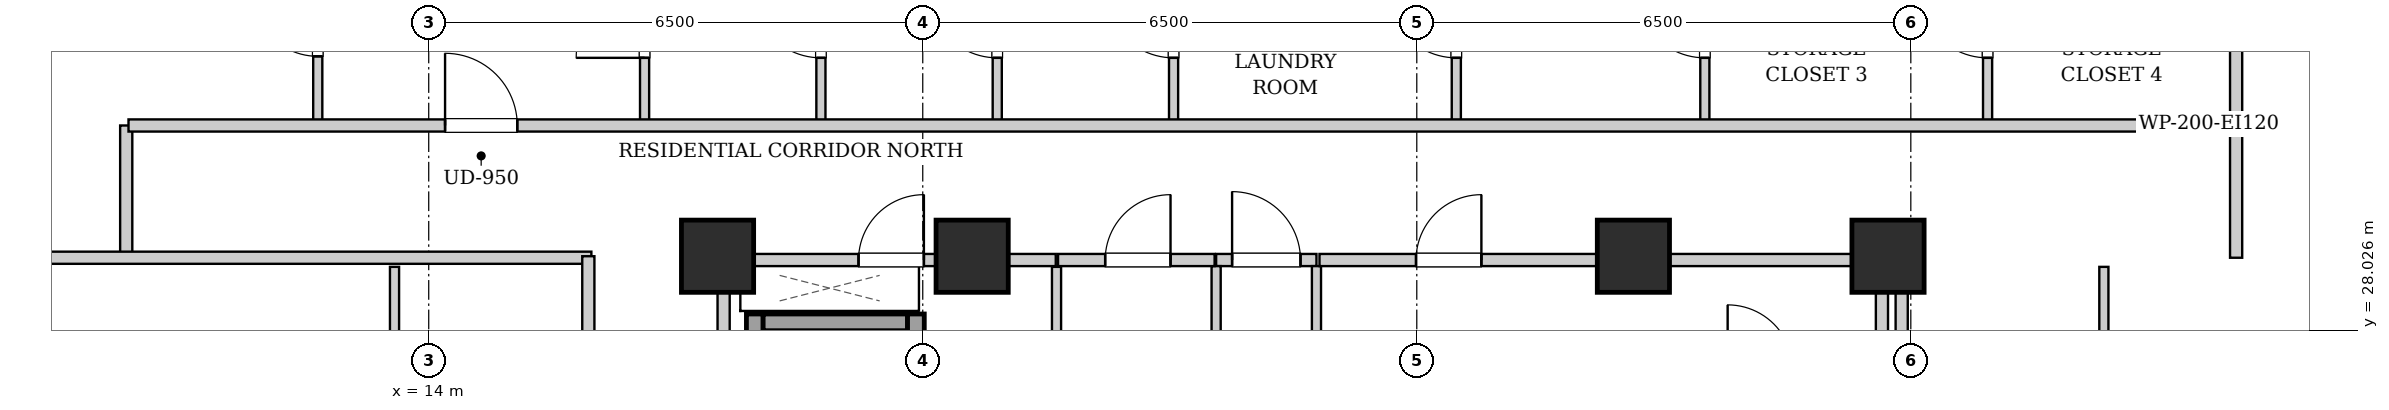
"""IFC4 building model, lengths in metres.
Left out: names, types, materials, properties, quantities, classifications, styles, units other than length and angle.
Written with IfcOpenShell. Run it as: python <this file> out.ifc"""

import sys

from ifc_helpers import new_model, si_unit, direction, frame, frame_2d, origin, origin_2d, place, context, subcontext, project, spatial, rectangle, extrude, element, fill, save


model = new_model("IFC4")
c1 = context("Model", 3, precision=1e-05, world=origin(), true_north=direction((0.0, 1.0)))
c2 = subcontext(c1, "Body", "Model", "MODEL_VIEW")
j1 = project(units=[si_unit("LENGTHUNIT", "METRE"), si_unit("PLANEANGLEUNIT", "RADIAN")], contexts=[c1])
p1 = place(None, origin())
s1 = spatial("IfcSite", under=j1, at=p1, CompositionType="ELEMENT")
p2 = place(p1, origin())
s2 = spatial("IfcBuilding", under=s1, at=p2, CompositionType="ELEMENT")
p3 = place(p2, frame((0.0, 0.0, 160.15)))
s3 = spatial("IfcBuildingStorey", under=s2, at=p3, CompositionType="ELEMENT", Elevation=160.15)
for number, where, z_axis, x_axis in (
    (1, (17.8, 29.0, 0.0), (0.0, 0.0, 1.0), (1.0, 0.0, 0.0)),
    (2, (21.15, 29.0, 0.0), (0.0, 0.0, 1.0), (1.0, 0.0, 0.0)),
    (3, (29.85, 29.0, 0.0), (0.0, 0.0, 1.0), (1.0, 0.0, 0.0)),
    (4, (33.2, 29.0, 0.0), (0.0, 0.0, 1.0), (1.0, 0.0, 0.0)),
):
    element("IfcColumn", number, at=place(p3, frame(where, z_axis=z_axis, x_axis=x_axis)), inside=s3, PredefinedType="COLUMN", context=c2, shape_type="SweptSolid", body=[
        extrude(rectangle(XDim=0.95, YDim=0.95, at=origin_2d()), origin(), (0.0, 0.0, 1.0), 3.25),
    ])
p4 = place(p3, frame((18.29, 24.1, 0.0), z_axis=(0.0, 0.0, 1.0), x_axis=(0.0, 1.0, 0.0)))
e5 = element("IfcWall", 5, at=p4, inside=s3, PredefinedType="SHEAR", context=c2, shape_type="SweptSolid", body=[
    extrude(rectangle(XDim=4.14, YDim=0.22, at=frame_2d((2.07, 0.0))), origin(), (0.0, 0.0, 1.0), 2.99),
])
p5 = place(p3, frame((18.4, 28.13, 0.0), z_axis=(0.0, 0.0, 1.0), x_axis=(1.0, 0.0, 0.0)))
e6 = element("IfcWall", 6, at=p5, inside=s3, PredefinedType="SHEAR", context=c2, shape_type="SweptSolid", body=[
    extrude(rectangle(XDim=1.9, YDim=0.22, at=frame_2d((0.95, 0.0))), origin(), (0.0, 0.0, 1.0), 2.99),
])
p6 = place(p3, frame((20.41, 26.06, 0.0), z_axis=(0.0, 0.0, 1.0), x_axis=(0.0, 1.0, 0.0)))
e7 = element("IfcWall", 7, at=p6, inside=s3, PredefinedType="SHEAR", context=c2, shape_type="SweptSolid", body=[
    extrude(rectangle(XDim=2.18, YDim=0.22, at=frame_2d((1.09, 0.0))), origin(), (0.0, 0.0, 1.0), 2.99),
])
for number, where, z_axis, x_axis in (
    (8, (17.88, 24.12, 0.0), (0.0, 0.0, 1.0), (0.0, 1.0, 0.0)),
    (9, (33.12, 24.12, 0.0), (0.0, 0.0, 1.0), (0.0, 1.0, 0.0)),
):
    element("IfcWall", number, at=place(p3, frame(where, z_axis=z_axis, x_axis=x_axis)), inside=s3, PredefinedType="PARTITIONING", context=c2, shape_type="SweptSolid", body=[
        extrude(rectangle(XDim=4.76, YDim=0.16, at=frame_2d((2.38, 0.0))), origin(), (0.0, 0.0, 1.0), 2.99),
    ])
p7 = place(p3, frame((24.36, 28.95, 0.0), z_axis=(0.0, 0.0, 1.0), x_axis=(1.0, 0.0, 0.0)))
e10 = element("IfcWall", 10, at=p7, inside=s3, PredefinedType="PARTITIONING", context=c2, shape_type="SweptSolid", body=[
    extrude(rectangle(XDim=1.32, YDim=0.16, at=frame_2d((0.66, 0.0))), origin(), (0.0, 0.0, 1.0), 2.442),
])
p8 = place(p7, frame((0.21, 0.0, 0.0)))
e11 = element("IfcOpeningElement", 11, at=p8, cuts=e10, PredefinedType="OPENING", context=c2, shape_type="SweptSolid", body=[
    extrude(rectangle(XDim=0.9, YDim=2.05, at=frame_2d((0.45, 1.025))), frame((0.0, 0.09, 0.0), z_axis=(0.0, -1.0, 0.0), x_axis=(1.0, 0.0, 0.0)), (0.0, 0.0, 1.0), 0.18),
])
p9 = place(p3, frame((17.96, 28.95, 0.0), z_axis=(0.0, 0.0, 1.0), x_axis=(1.0, 0.0, 0.0)))
e12 = element("IfcWall", 12, at=p9, inside=s3, PredefinedType="PARTITIONING", context=c2, shape_type="SweptSolid", body=[
    extrude(rectangle(XDim=4.29, YDim=0.16, at=frame_2d((2.145, 0.0))), origin(), (0.0, 0.0, 1.0), 2.442),
])
p10 = place(p9, frame((1.695, 0.0, 0.0)))
e13 = element("IfcOpeningElement", 13, at=p10, cuts=e12, PredefinedType="OPENING", context=c2, shape_type="SweptSolid", body=[
    extrude(rectangle(XDim=0.86, YDim=2.05, at=frame_2d((0.43, 1.025))), frame((0.0, 0.09, 0.0), z_axis=(0.0, -1.0, 0.0), x_axis=(1.0, 0.0, 0.0)), (0.0, 0.0, 1.0), 0.18),
])
for number, where, z_axis, x_axis in (
    (14, (24.36, 25.0, 0.0), (0.0, 0.0, 1.0), (0.0, 1.0, 0.0)),
    (15, (25.68, 25.0, 0.0), (0.0, 0.0, 1.0), (0.0, 1.0, 0.0)),
):
    element("IfcWall", number, at=place(p3, frame(where, z_axis=z_axis, x_axis=x_axis)), inside=s3, PredefinedType="PARTITIONING", context=c2, shape_type="SweptSolid", body=[
        extrude(rectangle(XDim=3.87, YDim=0.12, at=frame_2d((1.935, 0.0))), origin(), (0.0, 0.0, 1.0), 2.99),
    ])
p11 = place(p3, frame((22.26, 25.0, 0.0), z_axis=(0.0, 0.0, 1.0), x_axis=(0.0, 1.0, 0.0)))
e16 = element("IfcWall", 16, at=p11, inside=s3, PredefinedType="PARTITIONING", context=c2, shape_type="SweptSolid", body=[
    extrude(rectangle(XDim=3.86, YDim=0.12, at=frame_2d((1.93, 0.0))), origin(), (0.0, 0.0, 1.0), 2.99),
])
p12 = place(p3, frame((22.28, 28.95, 0.0), z_axis=(0.0, 0.0, 1.0), x_axis=(1.0, 0.0, 0.0)))
e17 = element("IfcWall", 17, at=p12, inside=s3, PredefinedType="PARTITIONING", context=c2, shape_type="SweptSolid", body=[
    extrude(rectangle(XDim=2.06, YDim=0.16, at=frame_2d((1.03, 0.0))), origin(), (0.0, 0.0, 1.0), 2.442),
])
p13 = place(p12, frame((0.62, 0.0, 0.0)))
e18 = element("IfcOpeningElement", 18, at=p13, cuts=e17, PredefinedType="OPENING", context=c2, shape_type="SweptSolid", body=[
    extrude(rectangle(XDim=0.86, YDim=2.05, at=frame_2d((0.43, 1.025))), frame((0.0, 0.09, 0.0), z_axis=(0.0, -1.0, 0.0), x_axis=(1.0, 0.0, 0.0)), (0.0, 0.0, 1.0), 0.18),
])
p14 = place(p3, frame((25.72, 28.95, 0.0), z_axis=(0.0, 0.0, 1.0), x_axis=(1.0, 0.0, 0.0)))
e19 = element("IfcWall", 19, at=p14, inside=s3, PredefinedType="PARTITIONING", context=c2, shape_type="SweptSolid", body=[
    extrude(rectangle(XDim=7.32, YDim=0.16, at=frame_2d((3.66, 0.0))), origin(), (0.0, 0.0, 1.0), 2.442),
])
p15 = place(p14, frame((1.27, 0.0, 0.0)))
e20 = element("IfcOpeningElement", 20, at=p15, cuts=e19, PredefinedType="OPENING", context=c2, shape_type="SweptSolid", body=[
    extrude(rectangle(XDim=0.86, YDim=2.05, at=frame_2d((0.43, 1.025))), frame((0.0, 0.09, 0.0), z_axis=(0.0, -1.0, 0.0), x_axis=(1.0, 0.0, 0.0)), (0.0, 0.0, 1.0), 0.18),
])
for number, where, z_axis, x_axis in (
    (21, (10.02, 28.98, 0.0), (0.0, 0.0, 1.0), (0.0, 1.0, 0.0)),
    (22, (37.78, 28.98, 0.0), (0.0, 0.0, 1.0), (0.0, 1.0, 0.0)),
):
    element("IfcWall", number, at=place(p3, frame(where, z_axis=z_axis, x_axis=x_axis)), inside=s3, PredefinedType="PARTITIONING", context=c2, shape_type="SweptSolid", body=[
        extrude(rectangle(XDim=1.74, YDim=0.16, at=frame_2d((0.87, 0.0))), origin(), (0.0, 0.0, 1.0), 2.99),
    ])
p16 = place(p3, frame((7.78, 28.98, 0.0), z_axis=(0.0, 0.0, 1.0), x_axis=(1.0, 0.0, 0.0)))
e23 = element("IfcWall", 23, at=p16, inside=s3, PredefinedType="PARTITIONING", context=c2, shape_type="SweptSolid", body=[
    extrude(rectangle(XDim=8.36, YDim=0.16, at=frame_2d((4.18, 0.0))), origin(), (0.0, 0.0, 1.0), 2.442),
])
p17 = place(p3, frame((37.78, 30.76, 0.0), z_axis=(0.0, 0.0, 1.0), x_axis=(0.0, 1.0, 0.0)))
e24 = element("IfcWall", 24, at=p17, inside=s3, PredefinedType="PARTITIONING", context=c2, shape_type="SweptSolid", body=[
    extrude(rectangle(XDim=2.66, YDim=0.16, at=frame_2d((1.33, 0.0))), origin(), (0.0, 0.0, 1.0), 2.99),
])
p18 = place(p3, frame((12.54, 30.76, 0.0), z_axis=(0.0, 0.0, 1.0), x_axis=(0.0, 1.0, 0.0)))
e25 = element("IfcWall", 25, at=p18, inside=s3, PredefinedType="PARTITIONING", context=c2, shape_type="SweptSolid", body=[
    extrude(rectangle(XDim=2.6, YDim=0.12, at=frame_2d((1.3, 0.0))), origin(), (0.0, 0.0, 1.0), 2.99),
])
p19 = place(p18, frame((0.87, 0.0, 0.0)))
e26 = element("IfcOpeningElement", 26, at=p19, cuts=e25, PredefinedType="OPENING", context=c2, shape_type="SweptSolid", body=[
    extrude(rectangle(XDim=0.86, YDim=2.05, at=frame_2d((0.43, 1.025))), frame((0.0, 0.07, 0.0), z_axis=(0.0, -1.0, 0.0), x_axis=(1.0, 0.0, 0.0)), (0.0, 0.0, 1.0), 0.14),
])
p20 = place(p3, frame((16.84, 30.76, 0.0), z_axis=(0.0, 0.0, 1.0), x_axis=(0.0, 1.0, 0.0)))
e27 = element("IfcWall", 27, at=p20, inside=s3, PredefinedType="PARTITIONING", context=c2, shape_type="SweptSolid", body=[
    extrude(rectangle(XDim=2.6, YDim=0.12, at=frame_2d((1.3, 0.0))), origin(), (0.0, 0.0, 1.0), 2.99),
])
p21 = place(p20, frame((0.85, 0.0, 0.0)))
e28 = element("IfcOpeningElement", 28, at=p21, cuts=e27, PredefinedType="OPENING", context=c2, shape_type="SweptSolid", body=[
    extrude(rectangle(XDim=0.9, YDim=2.05, at=frame_2d((0.45, 1.025))), frame((0.0, 0.07, 0.0), z_axis=(0.0, -1.0, 0.0), x_axis=(1.0, 0.0, 0.0)), (0.0, 0.0, 1.0), 0.14),
])
p22 = place(p3, frame((19.16, 30.76, 0.0), z_axis=(0.0, 0.0, 1.0), x_axis=(0.0, 1.0, 0.0)))
e29 = element("IfcWall", 29, at=p22, inside=s3, PredefinedType="PARTITIONING", context=c2, shape_type="SweptSolid", body=[
    extrude(rectangle(XDim=2.6, YDim=0.12, at=frame_2d((1.3, 0.0))), origin(), (0.0, 0.0, 1.0), 2.99),
])
p23 = place(p22, frame((0.85, 0.0, 0.0)))
e30 = element("IfcOpeningElement", 30, at=p23, cuts=e29, PredefinedType="OPENING", context=c2, shape_type="SweptSolid", body=[
    extrude(rectangle(XDim=0.9, YDim=2.05, at=frame_2d((0.45, 1.025))), frame((0.0, 0.07, 0.0), z_axis=(0.0, -1.0, 0.0), x_axis=(1.0, 0.0, 0.0)), (0.0, 0.0, 1.0), 0.14),
])
p24 = place(p3, frame((21.48, 30.76, 0.0), z_axis=(0.0, 0.0, 1.0), x_axis=(0.0, 1.0, 0.0)))
e31 = element("IfcWall", 31, at=p24, inside=s3, PredefinedType="PARTITIONING", context=c2, shape_type="SweptSolid", body=[
    extrude(rectangle(XDim=2.6, YDim=0.12, at=frame_2d((1.3, 0.0))), origin(), (0.0, 0.0, 1.0), 2.99),
])
p25 = place(p24, frame((0.85, 0.0, 0.0)))
e32 = element("IfcOpeningElement", 32, at=p25, cuts=e31, PredefinedType="OPENING", context=c2, shape_type="SweptSolid", body=[
    extrude(rectangle(XDim=0.9, YDim=2.05, at=frame_2d((0.45, 1.025))), frame((0.0, 0.07, 0.0), z_axis=(0.0, -1.0, 0.0), x_axis=(1.0, 0.0, 0.0)), (0.0, 0.0, 1.0), 0.14),
])
p26 = place(p3, frame((23.8, 30.76, 0.0), z_axis=(0.0, 0.0, 1.0), x_axis=(0.0, 1.0, 0.0)))
e33 = element("IfcWall", 33, at=p26, inside=s3, PredefinedType="PARTITIONING", context=c2, shape_type="SweptSolid", body=[
    extrude(rectangle(XDim=2.6, YDim=0.12, at=frame_2d((1.3, 0.0))), origin(), (0.0, 0.0, 1.0), 2.99),
])
p27 = place(p26, frame((0.85, 0.0, 0.0)))
e34 = element("IfcOpeningElement", 34, at=p27, cuts=e33, PredefinedType="OPENING", context=c2, shape_type="SweptSolid", body=[
    extrude(rectangle(XDim=0.9, YDim=2.05, at=frame_2d((0.45, 1.025))), frame((0.0, 0.07, 0.0), z_axis=(0.0, -1.0, 0.0), x_axis=(1.0, 0.0, 0.0)), (0.0, 0.0, 1.0), 0.14),
])
p28 = place(p3, frame((27.52, 30.76, 0.0), z_axis=(0.0, 0.0, 1.0), x_axis=(0.0, 1.0, 0.0)))
e35 = element("IfcWall", 35, at=p28, inside=s3, PredefinedType="PARTITIONING", context=c2, shape_type="SweptSolid", body=[
    extrude(rectangle(XDim=2.6, YDim=0.12, at=frame_2d((1.3, 0.0))), origin(), (0.0, 0.0, 1.0), 2.99),
])
p29 = place(p28, frame((0.85, 0.0, 0.0)))
e36 = element("IfcOpeningElement", 36, at=p29, cuts=e35, PredefinedType="OPENING", context=c2, shape_type="SweptSolid", body=[
    extrude(rectangle(XDim=0.9, YDim=2.05, at=frame_2d((0.45, 1.025))), frame((0.0, 0.07, 0.0), z_axis=(0.0, -1.0, 0.0), x_axis=(1.0, 0.0, 0.0)), (0.0, 0.0, 1.0), 0.14),
])
p30 = place(p3, frame((30.79, 30.76, 0.0), z_axis=(0.0, 0.0, 1.0), x_axis=(0.0, 1.0, 0.0)))
e37 = element("IfcWall", 37, at=p30, inside=s3, PredefinedType="PARTITIONING", context=c2, shape_type="SweptSolid", body=[
    extrude(rectangle(XDim=2.6, YDim=0.12, at=frame_2d((1.3, 0.0))), origin(), (0.0, 0.0, 1.0), 2.99),
])
p31 = place(p30, frame((0.85, 0.0, 0.0)))
e38 = element("IfcOpeningElement", 38, at=p31, cuts=e37, PredefinedType="OPENING", context=c2, shape_type="SweptSolid", body=[
    extrude(rectangle(XDim=0.9, YDim=2.05, at=frame_2d((0.45, 1.025))), frame((0.0, 0.07, 0.0), z_axis=(0.0, -1.0, 0.0), x_axis=(1.0, 0.0, 0.0)), (0.0, 0.0, 1.0), 0.14),
])
p32 = place(p3, frame((34.51, 30.76, 0.0), z_axis=(0.0, 0.0, 1.0), x_axis=(0.0, 1.0, 0.0)))
e39 = element("IfcWall", 39, at=p32, inside=s3, PredefinedType="PARTITIONING", context=c2, shape_type="SweptSolid", body=[
    extrude(rectangle(XDim=2.6, YDim=0.12, at=frame_2d((1.3, 0.0))), origin(), (0.0, 0.0, 1.0), 2.99),
])
p33 = place(p32, frame((0.85, 0.0, 0.0)))
e40 = element("IfcOpeningElement", 40, at=p33, cuts=e39, PredefinedType="OPENING", context=c2, shape_type="SweptSolid", body=[
    extrude(rectangle(XDim=0.9, YDim=2.05, at=frame_2d((0.45, 1.025))), frame((0.0, 0.07, 0.0), z_axis=(0.0, -1.0, 0.0), x_axis=(1.0, 0.0, 0.0)), (0.0, 0.0, 1.0), 0.14),
])
p34 = place(p3, frame((13.55, 24.552, 0.0), z_axis=(0.0, 0.0, 1.0), x_axis=(0.0, 1.0, 0.0)))
e41 = element("IfcWall", 41, at=p34, inside=s3, PredefinedType="PARTITIONING", context=c2, shape_type="SweptSolid", body=[
    extrude(rectangle(XDim=4.308, YDim=0.12, at=frame_2d((2.154, 0.0))), origin(), (0.0, 0.0, 1.0), 2.99),
])
p35 = place(p34, frame((1.704, 0.0, 0.0)))
e42 = element("IfcOpeningElement", 42, at=p35, cuts=e41, PredefinedType="OPENING", context=c2, shape_type="SweptSolid", body=[
    extrude(rectangle(XDim=0.9, YDim=2.05, at=frame_2d((0.45, 1.025))), frame((0.0, 0.07, 0.0), z_axis=(0.0, -1.0, 0.0), x_axis=(1.0, 0.0, 0.0)), (0.0, 0.0, 1.0), 0.14),
])
p36 = place(p3, frame((36.04, 24.552, 0.0), z_axis=(0.0, 0.0, 1.0), x_axis=(0.0, 1.0, 0.0)))
e43 = element("IfcWall", 43, at=p36, inside=s3, PredefinedType="PARTITIONING", context=c2, shape_type="SweptSolid", body=[
    extrude(rectangle(XDim=4.308, YDim=0.12, at=frame_2d((2.154, 0.0))), origin(), (0.0, 0.0, 1.0), 2.99),
])
p37 = place(p36, frame((1.704, 0.0, 0.0)))
e44 = element("IfcOpeningElement", 44, at=p37, cuts=e43, PredefinedType="OPENING", context=c2, shape_type="SweptSolid", body=[
    extrude(rectangle(XDim=0.9, YDim=2.05, at=frame_2d((0.45, 1.025))), frame((0.0, 0.07, 0.0), z_axis=(0.0, -1.0, 0.0), x_axis=(1.0, 0.0, 0.0)), (0.0, 0.0, 1.0), 0.14),
])
p38 = place(p3, frame((10.05, 30.72, 0.0), z_axis=(0.0, 0.0, 1.0), x_axis=(1.0, 0.0, 0.0)))
e45 = element("IfcWall", 45, at=p38, inside=s3, PredefinedType="PARTITIONING", context=c2, shape_type="SweptSolid", body=[
    extrude(rectangle(XDim=27.7, YDim=0.16, at=frame_2d((13.85, 0.0))), origin(), (0.0, 0.0, 1.0), 2.99),
])
p39 = place(p38, frame((4.165, 0.0, 0.0)))
e46 = element("IfcOpeningElement", 46, at=p39, cuts=e45, PredefinedType="OPENING", context=c2, shape_type="SweptSolid", body=[
    extrude(rectangle(XDim=0.95, YDim=2.1, at=frame_2d((0.475, 1.05))), frame((0.0, 0.09, 0.0), z_axis=(0.0, -1.0, 0.0), x_axis=(1.0, 0.0, 0.0)), (0.0, 0.0, 1.0), 0.18),
])
p40 = place(p3, frame((16.1, 15.07, 0.0), z_axis=(0.0, 0.0, 1.0), x_axis=(0.0, 1.0, 0.0)))
e47 = element("IfcWall", 47, at=p40, inside=s3, PredefinedType="PARTITIONING", context=c2, shape_type="SweptSolid", body=[
    extrude(rectangle(XDim=13.93, YDim=0.16, at=frame_2d((6.965, 0.0))), origin(), (0.0, 0.0, 1.0), 2.99),
])
p41 = place(p40, frame((4.385, 0.0, 0.0)))
e48 = element("IfcOpeningElement", 48, at=p41, cuts=e47, PredefinedType="OPENING", context=c2, shape_type="SweptSolid", body=[
    extrude(rectangle(XDim=0.95, YDim=2.1, at=frame_2d((0.475, 1.05))), frame((0.0, 0.09, 0.0), z_axis=(0.0, -1.0, 0.0), x_axis=(1.0, 0.0, 0.0)), (0.0, 0.0, 1.0), 0.18),
])
p42 = place(p3, frame((33.38, 15.02, 0.0), z_axis=(0.0, 0.0, 1.0), x_axis=(0.0, 1.0, 0.0)))
e49 = element("IfcWall", 49, at=p42, inside=s3, PredefinedType="PARTITIONING", context=c2, shape_type="SweptSolid", body=[
    extrude(rectangle(XDim=13.98, YDim=0.16, at=frame_2d((6.99, 0.0))), origin(), (0.0, 0.0, 1.0), 2.99),
])
p43 = place(p8, origin())
e50 = element("IfcDoor", 50, at=p43, inside=s3, OperationType="SINGLE_SWING_LEFT", PredefinedType="DOOR", context=c2, shape_type="SweptSolid", body=[
    extrude(rectangle(XDim=0.9, YDim=2.05, at=frame_2d((0.45, 1.025))), frame((0.0, 0.025, 0.0), z_axis=(0.0, -1.0, 0.0), x_axis=(1.0, 0.0, 0.0)), (0.0, 0.0, 1.0), 0.05),
])
fill(e11, e50)
p44 = place(p10, origin())
e51 = element("IfcDoor", 51, at=p44, inside=s3, OperationType="SINGLE_SWING_RIGHT", PredefinedType="DOOR", context=c2, shape_type="SweptSolid", body=[
    extrude(rectangle(XDim=0.86, YDim=2.05, at=frame_2d((0.43, 1.025))), frame((0.0, 0.025, 0.0), z_axis=(0.0, -1.0, 0.0), x_axis=(1.0, 0.0, 0.0)), (0.0, 0.0, 1.0), 0.05),
])
fill(e13, e51)
p45 = place(p13, origin())
e52 = element("IfcDoor", 52, at=p45, inside=s3, OperationType="SINGLE_SWING_RIGHT", PredefinedType="DOOR", context=c2, shape_type="SweptSolid", body=[
    extrude(rectangle(XDim=0.86, YDim=2.05, at=frame_2d((0.43, 1.025))), frame((0.0, 0.025, 0.0), z_axis=(0.0, -1.0, 0.0), x_axis=(1.0, 0.0, 0.0)), (0.0, 0.0, 1.0), 0.05),
])
fill(e18, e52)
p46 = place(p15, origin())
e53 = element("IfcDoor", 53, at=p46, inside=s3, OperationType="SINGLE_SWING_RIGHT", PredefinedType="DOOR", context=c2, shape_type="SweptSolid", body=[
    extrude(rectangle(XDim=0.86, YDim=2.05, at=frame_2d((0.43, 1.025))), frame((0.0, 0.025, 0.0), z_axis=(0.0, -1.0, 0.0), x_axis=(1.0, 0.0, 0.0)), (0.0, 0.0, 1.0), 0.05),
])
fill(e20, e53)
p47 = place(p19, origin())
e54 = element("IfcDoor", 54, at=p47, inside=s3, OperationType="SINGLE_SWING_RIGHT", PredefinedType="DOOR", context=c2, shape_type="SweptSolid", body=[
    extrude(rectangle(XDim=0.86, YDim=2.05, at=frame_2d((0.43, 1.025))), frame((0.0, 0.025, 0.0), z_axis=(0.0, -1.0, 0.0), x_axis=(1.0, 0.0, 0.0)), (0.0, 0.0, 1.0), 0.05),
])
fill(e26, e54)
p48 = place(p21, origin())
e55 = element("IfcDoor", 55, at=p48, inside=s3, OperationType="SINGLE_SWING_LEFT", PredefinedType="DOOR", context=c2, shape_type="SweptSolid", body=[
    extrude(rectangle(XDim=0.9, YDim=2.05, at=frame_2d((0.45, 1.025))), frame((0.0, 0.025, 0.0), z_axis=(0.0, -1.0, 0.0), x_axis=(1.0, 0.0, 0.0)), (0.0, 0.0, 1.0), 0.05),
])
fill(e28, e55)
p49 = place(p23, origin())
e56 = element("IfcDoor", 56, at=p49, inside=s3, OperationType="SINGLE_SWING_RIGHT", PredefinedType="DOOR", context=c2, shape_type="SweptSolid", body=[
    extrude(rectangle(XDim=0.9, YDim=2.05, at=frame_2d((0.45, 1.025))), frame((0.0, 0.025, 0.0), z_axis=(0.0, -1.0, 0.0), x_axis=(1.0, 0.0, 0.0)), (0.0, 0.0, 1.0), 0.05),
])
fill(e30, e56)
p50 = place(p25, origin())
e57 = element("IfcDoor", 57, at=p50, inside=s3, OperationType="SINGLE_SWING_RIGHT", PredefinedType="DOOR", context=c2, shape_type="SweptSolid", body=[
    extrude(rectangle(XDim=0.9, YDim=2.05, at=frame_2d((0.45, 1.025))), frame((0.0, 0.025, 0.0), z_axis=(0.0, -1.0, 0.0), x_axis=(1.0, 0.0, 0.0)), (0.0, 0.0, 1.0), 0.05),
])
fill(e32, e57)
p51 = place(p27, origin())
e58 = element("IfcDoor", 58, at=p51, inside=s3, OperationType="SINGLE_SWING_RIGHT", PredefinedType="DOOR", context=c2, shape_type="SweptSolid", body=[
    extrude(rectangle(XDim=0.9, YDim=2.05, at=frame_2d((0.45, 1.025))), frame((0.0, 0.025, 0.0), z_axis=(0.0, -1.0, 0.0), x_axis=(1.0, 0.0, 0.0)), (0.0, 0.0, 1.0), 0.05),
])
fill(e34, e58)
p52 = place(p29, origin())
e59 = element("IfcDoor", 59, at=p52, inside=s3, OperationType="SINGLE_SWING_RIGHT", PredefinedType="DOOR", context=c2, shape_type="SweptSolid", body=[
    extrude(rectangle(XDim=0.9, YDim=2.05, at=frame_2d((0.45, 1.025))), frame((0.0, 0.025, 0.0), z_axis=(0.0, -1.0, 0.0), x_axis=(1.0, 0.0, 0.0)), (0.0, 0.0, 1.0), 0.05),
])
fill(e36, e59)
p53 = place(p31, origin())
e60 = element("IfcDoor", 60, at=p53, inside=s3, OperationType="SINGLE_SWING_RIGHT", PredefinedType="DOOR", context=c2, shape_type="SweptSolid", body=[
    extrude(rectangle(XDim=0.9, YDim=2.05, at=frame_2d((0.45, 1.025))), frame((0.0, 0.025, 0.0), z_axis=(0.0, -1.0, 0.0), x_axis=(1.0, 0.0, 0.0)), (0.0, 0.0, 1.0), 0.05),
])
fill(e38, e60)
p54 = place(p33, origin())
e61 = element("IfcDoor", 61, at=p54, inside=s3, OperationType="SINGLE_SWING_RIGHT", PredefinedType="DOOR", context=c2, shape_type="SweptSolid", body=[
    extrude(rectangle(XDim=0.9, YDim=2.05, at=frame_2d((0.45, 1.025))), frame((0.0, 0.025, 0.0), z_axis=(0.0, -1.0, 0.0), x_axis=(1.0, 0.0, 0.0)), (0.0, 0.0, 1.0), 0.05),
])
fill(e40, e61)
p55 = place(p39, origin())
e62 = element("IfcDoor", 62, at=p55, inside=s3, OperationType="SINGLE_SWING_LEFT", PredefinedType="DOOR", context=c2, shape_type="SweptSolid", body=[
    extrude(rectangle(XDim=0.95, YDim=2.1, at=frame_2d((0.475, 1.05))), frame((0.0, 0.025, 0.0), z_axis=(0.0, -1.0, 0.0), x_axis=(1.0, 0.0, 0.0)), (0.0, 0.0, 1.0), 0.05),
])
fill(e46, e62)
save(model, sys.argv[1])
